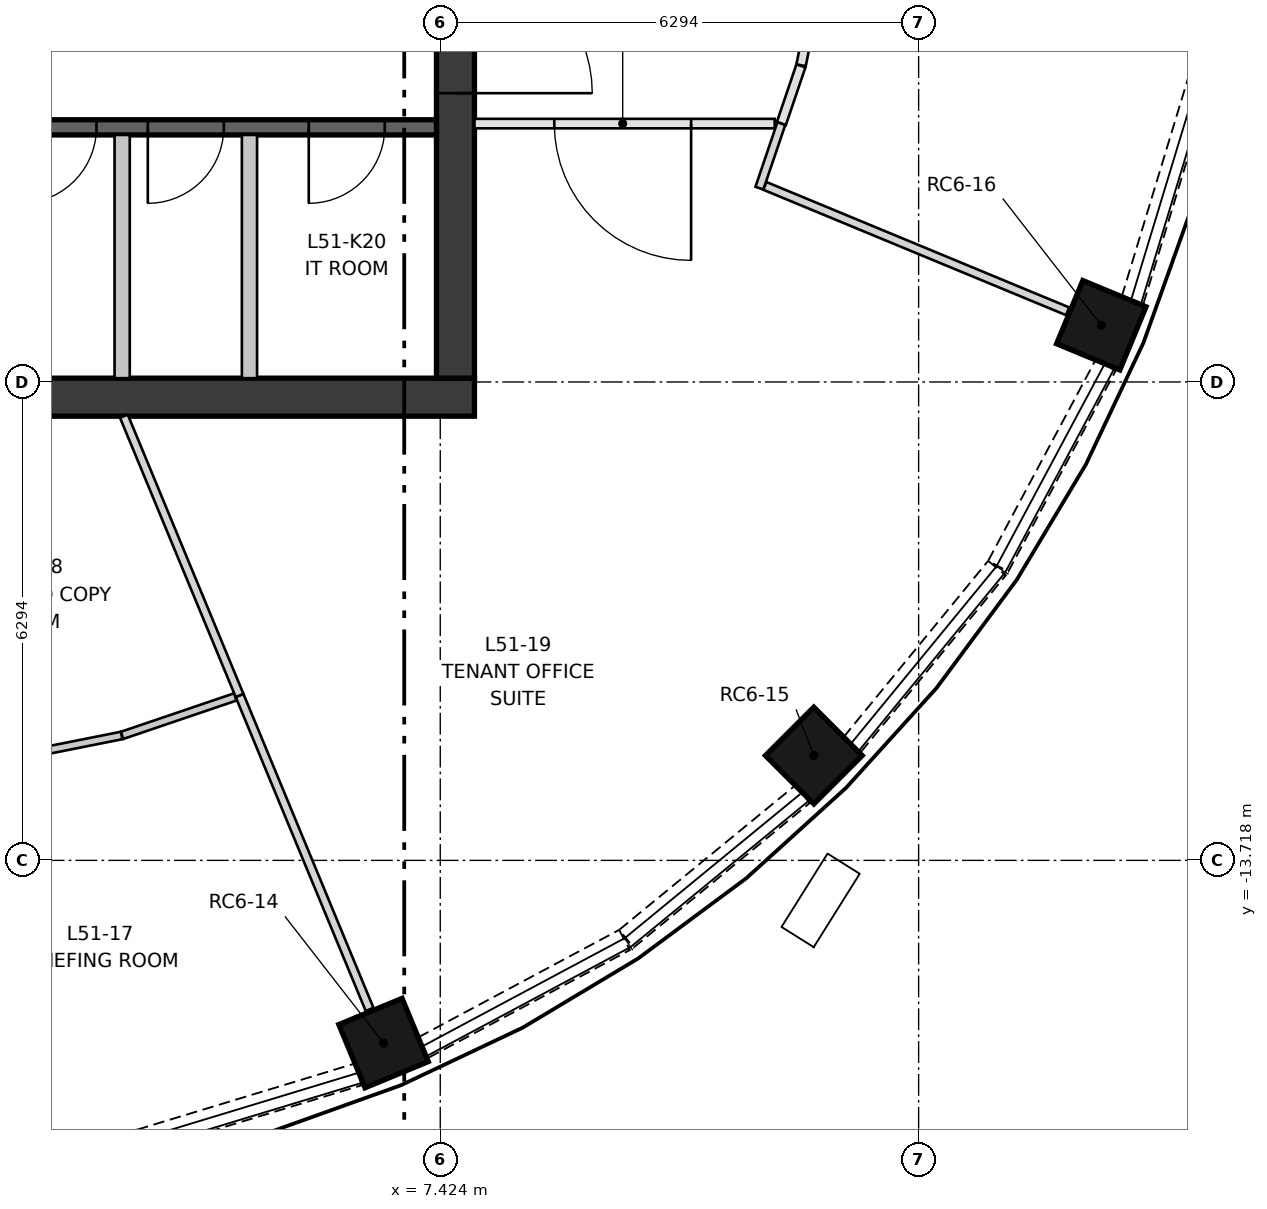
"""IFC4 building model, lengths in metres.
Left out: names, types, materials, properties, quantities, classifications, styles, units other than length and angle.
Written with IfcOpenShell. Run it as: python <this file> out.ifc"""

import sys

from ifc_helpers import new_model, si_unit, direction, frame, frame_2d, origin, origin_2d, place, context, subcontext, project, spatial, rectangle, extrude, element, fill, save


model = new_model("IFC4")
c1 = context("Model", 3, precision=1e-05, world=origin(), true_north=direction((0.0, 1.0)))
c2 = subcontext(c1, "Body", "Model", "MODEL_VIEW")
j1 = project(units=[si_unit("LENGTHUNIT", "METRE"), si_unit("PLANEANGLEUNIT", "RADIAN")], contexts=[c1])
p1 = place(None, origin())
s1 = spatial("IfcSite", under=j1, at=p1, CompositionType="ELEMENT")
p2 = place(p1, origin())
s2 = spatial("IfcBuilding", under=s1, at=p2, CompositionType="ELEMENT")
p3 = place(p2, frame((0.0, 0.0, 191.0)))
s3 = spatial("IfcBuildingStorey", under=s2, at=p3, CompositionType="ELEMENT", Elevation=191.0)
for number, where, z_axis, x_axis in (
    (1, (6.678, -16.122, 0.0), (0.0, 0.0, 1.0), (0.383, -0.924, 0.0)),
    (2, (12.339, -12.339, 0.0), (0.0, 0.0, 1.0), (0.707, -0.707, 0.0)),
    (3, (16.122, -6.678, 0.0), (0.0, 0.0, 1.0), (0.924, -0.383, 0.0)),
):
    element("IfcColumn", number, at=place(p3, frame(where, z_axis=z_axis, x_axis=x_axis)), inside=s3, PredefinedType="COLUMN", context=c2, shape_type="SweptSolid", body=[
        extrude(rectangle(XDim=0.9, YDim=0.9, at=origin_2d()), origin(), (0.0, 0.0, 1.0), 2.85),
    ])
p4 = place(p3, frame((-7.874, -7.624, 0.0), z_axis=(0.0, 0.0, 1.0), x_axis=(1.0, 0.0, 0.0)))
e4 = element("IfcWall", 4, at=p4, inside=s3, PredefinedType="SHEAR", context=c2, shape_type="SweptSolid", body=[
    extrude(rectangle(XDim=15.748, YDim=0.5, at=frame_2d((7.874, 0.0))), origin(), (0.0, 0.0, 1.0), 3.35),
])
p5 = place(p3, frame((7.624, -7.374, 0.0), z_axis=(0.0, 0.0, 1.0), x_axis=(0.0, 1.0, 0.0)))
e5 = element("IfcWall", 5, at=p5, inside=s3, PredefinedType="SHEAR", context=c2, shape_type="SweptSolid", body=[
    extrude(rectangle(XDim=14.748, YDim=0.5, at=frame_2d((7.374, 0.0))), origin(), (0.0, 0.0, 1.0), 3.35),
])
p6 = place(p5, frame((6.874, 0.0, 0.0)))
e6 = element("IfcOpeningElement", 6, at=p6, cuts=e5, PredefinedType="OPENING", context=c2, shape_type="SweptSolid", body=[
    extrude(rectangle(XDim=1.0, YDim=2.1, at=frame_2d((0.5, 1.05))), frame((0.0, 0.26, 0.0), z_axis=(0.0, -1.0, 0.0), x_axis=(1.0, 0.0, 0.0)), (0.0, 0.0, 1.0), 0.52),
])
p7 = place(p5, frame((3.75, 0.0, 0.0)))
e7 = element("IfcOpeningElement", 7, at=p7, cuts=e5, PredefinedType="OPENING", context=c2, shape_type="SweptSolid", body=[
    extrude(rectangle(XDim=1.8, YDim=2.1, at=frame_2d((0.9, 1.05))), frame((0.0, 0.26, 0.0), z_axis=(0.0, -1.0, 0.0), x_axis=(1.0, 0.0, 0.0)), (0.0, 0.0, 1.0), 0.52),
])
p8 = place(p5, frame((9.198, 0.0, 0.0)))
e8 = element("IfcOpeningElement", 8, at=p8, cuts=e5, PredefinedType="OPENING", context=c2, shape_type="SweptSolid", body=[
    extrude(rectangle(XDim=1.8, YDim=2.1, at=frame_2d((0.9, 1.05))), frame((0.0, 0.26, 0.0), z_axis=(0.0, -1.0, 0.0), x_axis=(1.0, 0.0, 0.0)), (0.0, 0.0, 1.0), 0.52),
])
p9 = place(p3, frame((-7.374, -4.074, 0.0), z_axis=(0.0, 0.0, 1.0), x_axis=(1.0, 0.0, 0.0)))
e9 = element("IfcWall", 9, at=p9, inside=s3, PredefinedType="SHEAR", context=c2, shape_type="SweptSolid", body=[
    extrude(rectangle(XDim=14.748, YDim=0.2, at=frame_2d((7.374, 0.0))), origin(), (0.0, 0.0, 1.0), 3.0),
])
p10 = place(p9, frame((1.319, 0.0, 0.0)))
e10 = element("IfcOpeningElement", 10, at=p10, cuts=e9, PredefinedType="OPENING", context=c2, shape_type="SweptSolid", body=[
    extrude(rectangle(XDim=1.1, YDim=2.1, at=frame_2d((0.55, 1.05))), frame((0.0, 0.11, 0.0), z_axis=(0.0, -1.0, 0.0), x_axis=(1.0, 0.0, 0.0)), (0.0, 0.0, 1.0), 0.22),
])
p11 = place(p9, frame((4.456, 0.0, 0.0)))
e11 = element("IfcOpeningElement", 11, at=p11, cuts=e9, PredefinedType="OPENING", context=c2, shape_type="SweptSolid", body=[
    extrude(rectangle(XDim=1.1, YDim=2.1, at=frame_2d((0.55, 1.05))), frame((0.0, 0.11, 0.0), z_axis=(0.0, -1.0, 0.0), x_axis=(1.0, 0.0, 0.0)), (0.0, 0.0, 1.0), 0.22),
])
p12 = place(p9, frame((7.256, 0.0, 0.0)))
e12 = element("IfcOpeningElement", 12, at=p12, cuts=e9, PredefinedType="OPENING", context=c2, shape_type="SweptSolid", body=[
    extrude(rectangle(XDim=1.0, YDim=2.1, at=frame_2d((0.5, 1.05))), frame((0.0, 0.11, 0.0), z_axis=(0.0, -1.0, 0.0), x_axis=(1.0, 0.0, 0.0)), (0.0, 0.0, 1.0), 0.22),
])
p13 = place(p9, frame((9.275, 0.0, 0.0)))
e13 = element("IfcOpeningElement", 13, at=p13, cuts=e9, PredefinedType="OPENING", context=c2, shape_type="SweptSolid", body=[
    extrude(rectangle(XDim=1.0, YDim=2.1, at=frame_2d((0.5, 1.05))), frame((0.0, 0.11, 0.0), z_axis=(0.0, -1.0, 0.0), x_axis=(1.0, 0.0, 0.0)), (0.0, 0.0, 1.0), 0.22),
])
p14 = place(p9, frame((10.95, 0.0, 0.0)))
e14 = element("IfcOpeningElement", 14, at=p14, cuts=e9, PredefinedType="OPENING", context=c2, shape_type="SweptSolid", body=[
    extrude(rectangle(XDim=1.0, YDim=2.1, at=frame_2d((0.5, 1.05))), frame((0.0, 0.11, 0.0), z_axis=(0.0, -1.0, 0.0), x_axis=(1.0, 0.0, 0.0)), (0.0, 0.0, 1.0), 0.22),
])
p15 = place(p9, frame((13.068, 0.0, 0.0)))
e15 = element("IfcOpeningElement", 15, at=p15, cuts=e9, PredefinedType="OPENING", context=c2, shape_type="SweptSolid", body=[
    extrude(rectangle(XDim=1.0, YDim=2.1, at=frame_2d((0.5, 1.05))), frame((0.0, 0.11, 0.0), z_axis=(0.0, -1.0, 0.0), x_axis=(1.0, 0.0, 0.0)), (0.0, 0.0, 1.0), 0.22),
])
for number, where, z_axis, x_axis in (
    (16, (3.239, -7.374, 0.0), (0.0, 0.0, 1.0), (0.0, 1.0, 0.0)),
    (17, (4.914, -7.374, 0.0), (0.0, 0.0, 1.0), (0.0, 1.0, 0.0)),
):
    element("IfcWall", number, at=place(p3, frame(where, z_axis=z_axis, x_axis=x_axis)), inside=s3, PredefinedType="PARTITIONING", context=c2, shape_type="SweptSolid", body=[
        extrude(rectangle(XDim=3.2, YDim=0.2, at=frame_2d((1.6, 0.0))), origin(), (0.0, 0.0, 1.0), 3.0),
    ])
p16 = place(p3, frame((3.477, -17.405, 0.0), z_axis=(0.0, 0.0, 1.0), x_axis=(0.95687774785, 0.290490921835, 0.0)))
e18 = element("IfcWall", 18, at=p16, inside=s3, PredefinedType="SOLIDWALL", context=c2, shape_type="SweptSolid", body=[
    extrude(rectangle(XDim=2.999, YDim=0.3, at=frame_2d((1.5, 0.0))), origin(), (0.0, 0.0, 1.0), 0.9),
])
p17 = place(p3, frame((7.204, -16.179, 0.0), z_axis=(0.0, 0.0, 1.0), x_axis=(0.881827169278, 0.471572734074, 0.0)))
e19 = element("IfcWall", 19, at=p17, inside=s3, PredefinedType="SOLIDWALL", context=c2, shape_type="SweptSolid", body=[
    extrude(rectangle(XDim=2.998, YDim=0.3, at=frame_2d((1.499, 0.0))), origin(), (0.0, 0.0, 1.0), 0.9),
])
for number, where, z_axis, x_axis in (
    (20, (9.873, -14.749, 0.0), (0.0, 0.0, 1.0), (0.773, 0.634, 0.0)),
    (21, (12.846, -12.191, 0.0), (0.0, 0.0, 1.0), (0.634, 0.773, 0.0)),
):
    element("IfcWall", number, at=place(p3, frame(where, z_axis=z_axis, x_axis=x_axis)), inside=s3, PredefinedType="SOLIDWALL", context=c2, shape_type="SweptSolid", body=[
        extrude(rectangle(XDim=2.999, YDim=0.3, at=frame_2d((1.5, 0.0))), origin(), (0.0, 0.0, 1.0), 0.9),
    ])
p18 = place(p3, frame((14.765, -9.848, 0.0), z_axis=(0.0, 0.0, 1.0), x_axis=(0.471572734074, 0.881827169278, 0.0)))
e22 = element("IfcWall", 22, at=p18, inside=s3, PredefinedType="SOLIDWALL", context=c2, shape_type="SweptSolid", body=[
    extrude(rectangle(XDim=2.998, YDim=0.3, at=frame_2d((1.499, 0.0))), origin(), (0.0, 0.0, 1.0), 0.9),
])
p19 = place(p3, frame((16.533, -6.347, 0.0), z_axis=(0.0, 0.0, 1.0), x_axis=(0.290490921835, 0.95687774785, 0.0)))
e23 = element("IfcWall", 23, at=p19, inside=s3, PredefinedType="SOLIDWALL", context=c2, shape_type="SweptSolid", body=[
    extrude(rectangle(XDim=2.999, YDim=0.3, at=frame_2d((1.5, 0.0))), origin(), (0.0, 0.0, 1.0), 0.9),
])
p20 = place(p3, frame((12.169, -3.265, 0.0), z_axis=(0.0, 0.0, 1.0), x_axis=(-0.321427947704, -0.946934039115, 0.0)))
e24 = element("IfcWall", 24, at=p20, inside=s3, PredefinedType="PARTITIONING", context=c2, shape_type="SweptSolid", body=[
    extrude(rectangle(XDim=0.802, YDim=0.125, at=frame_2d((0.401, 0.0))), origin(), (0.0, 0.0, 1.0), 3.0),
])
p21 = place(p3, frame((12.491, -1.649, 0.0), z_axis=(0.0, 0.0, 1.0), x_axis=(-0.195171279076, -0.980769173569, 0.0)))
e25 = element("IfcWall", 25, at=p21, inside=s3, PredefinedType="PARTITIONING", context=c2, shape_type="SweptSolid", body=[
    extrude(rectangle(XDim=1.64, YDim=0.125, at=frame_2d((0.82, 0.0))), origin(), (0.0, 0.0, 1.0), 3.0),
])
p22 = place(p3, frame((11.824, -4.024, 0.0), z_axis=(0.0, 0.0, 1.0), x_axis=(-1.0, 0.0, 0.0)))
e26 = element("IfcWall", 26, at=p22, inside=s3, PredefinedType="PARTITIONING", context=c2, shape_type="SweptSolid", body=[
    extrude(rectangle(XDim=3.95, YDim=0.125, at=frame_2d((1.975, 0.0))), origin(), (0.0, 0.0, 1.0), 3.0),
])
p23 = place(p22, frame((1.1, 0.0, 0.0)))
e27 = element("IfcOpeningElement", 27, at=p23, cuts=e26, PredefinedType="OPENING", context=c2, shape_type="SweptSolid", body=[
    extrude(rectangle(XDim=1.8, YDim=2.1, at=frame_2d((0.9, 1.05))), frame((0.0, 0.073, 0.0), z_axis=(0.0, -1.0, 0.0), x_axis=(1.0, 0.0, 0.0)), (0.0, 0.0, 1.0), 0.145),
])
p24 = place(p3, frame((11.623, -4.874, 0.0), z_axis=(0.0, 0.0, 1.0), x_axis=(0.321448894187, 0.946926928768, 0.0)))
e28 = element("IfcWall", 28, at=p24, inside=s3, PredefinedType="PARTITIONING", context=c2, shape_type="SweptSolid", body=[
    extrude(rectangle(XDim=0.897, YDim=0.11, at=frame_2d((0.448, 0.0))), origin(), (0.0, 0.0, 1.0), 3.0),
])
p25 = place(p3, frame((15.678, -6.494, 0.0), z_axis=(0.0, 0.0, 1.0), x_axis=(-0.923869121921, 0.382708564787, 0.0)))
e29 = element("IfcWall", 29, at=p25, inside=s3, PredefinedType="PARTITIONING", context=c2, shape_type="SweptSolid", body=[
    extrude(rectangle(XDim=4.311, YDim=0.11, at=frame_2d((2.156, 0.0))), origin(), (0.0, 0.0, 1.0), 3.0),
])
p26 = place(p3, frame((1.635, -12.393, 0.0), z_axis=(0.0, 0.0, 1.0), x_axis=(0.980764756379, 0.195193474902, 0.0)))
e30 = element("IfcWall", 30, at=p26, inside=s3, PredefinedType="PARTITIONING", context=c2, shape_type="SweptSolid", body=[
    extrude(rectangle(XDim=1.628, YDim=0.1, at=frame_2d((0.814, 0.0))), origin(), (0.0, 0.0, 1.0), 3.0),
])
p27 = place(p3, frame((3.238, -12.073, 0.0), z_axis=(0.0, 0.0, 1.0), x_axis=(0.946962681405, 0.321343554512, 0.0)))
e31 = element("IfcWall", 31, at=p27, inside=s3, PredefinedType="PARTITIONING", context=c2, shape_type="SweptSolid", body=[
    extrude(rectangle(XDim=1.573, YDim=0.1, at=frame_2d((0.787, 0.0))), origin(), (0.0, 0.0, 1.0), 3.0),
])
p28 = place(p3, frame((4.783, -11.549, 0.0), z_axis=(0.0, 0.0, 1.0), x_axis=(0.382710359347, -0.92386837853, 0.0)))
e32 = element("IfcWall", 32, at=p28, inside=s3, PredefinedType="PARTITIONING", context=c2, shape_type="SweptSolid", body=[
    extrude(rectangle(XDim=4.47, YDim=0.11, at=frame_2d((2.235, 0.0))), origin(), (0.0, 0.0, 1.0), 3.0),
])
p29 = place(p3, frame((3.261, -7.874, 0.0), z_axis=(0.0, 0.0, 1.0), x_axis=(0.382666229821, -0.923886657851, 0.0)))
e33 = element("IfcWall", 33, at=p29, inside=s3, PredefinedType="PARTITIONING", context=c2, shape_type="SweptSolid", body=[
    extrude(rectangle(XDim=3.977, YDim=0.11, at=frame_2d((1.989, 0.0))), origin(), (0.0, 0.0, 1.0), 3.0),
])
p30 = place(p13, frame((1.0, 0.0, 0.0), z_axis=(0.0, 0.0, 1.0), x_axis=(-1.0, 0.0, 0.0)))
e34 = element("IfcDoor", 34, at=p30, inside=s3, OperationType="SINGLE_SWING_LEFT", PredefinedType="DOOR", context=c2, shape_type="SweptSolid", body=[
    extrude(rectangle(XDim=1.0, YDim=2.1, at=frame_2d((0.5, 1.05))), frame((0.0, 0.025, 0.0), z_axis=(0.0, -1.0, 0.0), x_axis=(1.0, 0.0, 0.0)), (0.0, 0.0, 1.0), 0.05),
])
fill(e13, e34)
p31 = place(p14, frame((1.0, 0.0, 0.0), z_axis=(0.0, 0.0, 1.0), x_axis=(-1.0, 0.0, 0.0)))
e35 = element("IfcDoor", 35, at=p31, inside=s3, OperationType="SINGLE_SWING_LEFT", PredefinedType="DOOR", context=c2, shape_type="SweptSolid", body=[
    extrude(rectangle(XDim=1.0, YDim=2.1, at=frame_2d((0.5, 1.05))), frame((0.0, 0.025, 0.0), z_axis=(0.0, -1.0, 0.0), x_axis=(1.0, 0.0, 0.0)), (0.0, 0.0, 1.0), 0.05),
])
fill(e14, e35)
p32 = place(p15, frame((1.0, 0.0, 0.0), z_axis=(0.0, 0.0, 1.0), x_axis=(-1.0, 0.0, 0.0)))
e36 = element("IfcDoor", 36, at=p32, inside=s3, OperationType="SINGLE_SWING_LEFT", PredefinedType="DOOR", context=c2, shape_type="SweptSolid", body=[
    extrude(rectangle(XDim=1.0, YDim=2.1, at=frame_2d((0.5, 1.05))), frame((0.0, 0.025, 0.0), z_axis=(0.0, -1.0, 0.0), x_axis=(1.0, 0.0, 0.0)), (0.0, 0.0, 1.0), 0.05),
])
fill(e15, e36)
p33 = place(p7, frame((1.8, 0.0, 0.0), z_axis=(0.0, 0.0, 1.0), x_axis=(-1.0, 0.0, 0.0)))
e37 = element("IfcDoor", 37, at=p33, inside=s3, OperationType="DOUBLE_DOOR_SINGLE_SWING", PredefinedType="DOOR", context=c2, shape_type="SweptSolid", body=[
    extrude(rectangle(XDim=1.8, YDim=2.1, at=frame_2d((0.9, 1.05))), frame((0.0, 0.025, 0.0), z_axis=(0.0, -1.0, 0.0), x_axis=(1.0, 0.0, 0.0)), (0.0, 0.0, 1.0), 0.05),
])
fill(e7, e37)
p34 = place(p23, origin())
e38 = element("IfcDoor", 38, at=p34, inside=s3, OperationType="DOUBLE_DOOR_SINGLE_SWING", PredefinedType="DOOR", context=c2, shape_type="SweptSolid", body=[
    extrude(rectangle(XDim=1.8, YDim=2.1, at=frame_2d((0.9, 1.05))), frame((0.0, 0.025, 0.0), z_axis=(0.0, -1.0, 0.0), x_axis=(1.0, 0.0, 0.0)), (0.0, 0.0, 1.0), 0.05),
])
fill(e27, e38)
save(model, sys.argv[1])
